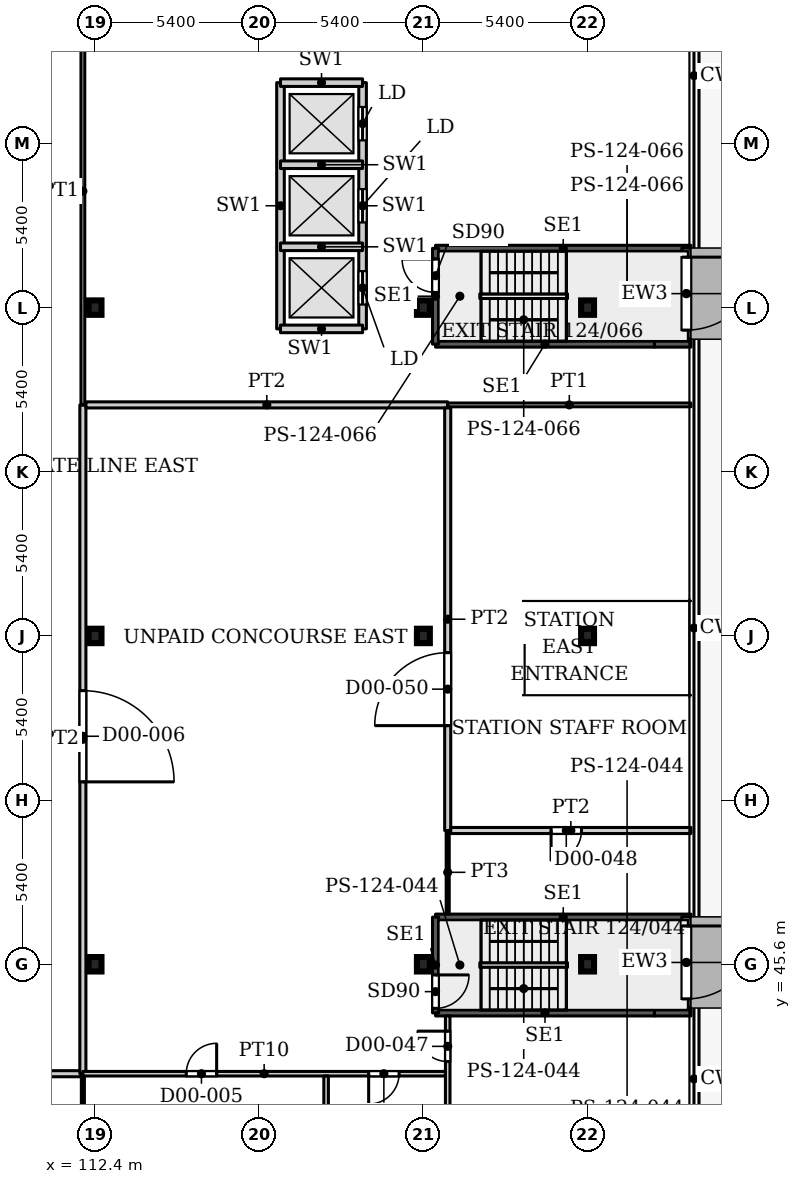
"""IFC4 building model, lengths in metres.
Left out: names, types, materials, properties, quantities, classifications, styles, units other than length and angle.
Written with IfcOpenShell. Run it as: python <this file> out.ifc"""

import sys

from ifc_helpers import new_model, si_unit, direction, frame, frame_2d, origin, origin_2d, place, context, subcontext, project, spatial, rectangle, i_section, extrude, source, transform, mapped, element, fill, save


model = new_model("IFC4")
c1 = context("Model", 3, precision=1e-05, world=origin(), true_north=direction((0.0, 1.0)))
c2 = subcontext(c1, "Body", "Model", "MODEL_VIEW")
j1 = project(units=[si_unit("LENGTHUNIT", "METRE"), si_unit("PLANEANGLEUNIT", "RADIAN")], contexts=[c1])
p1 = place(None, origin())
s1 = spatial("IfcSite", under=j1, at=p1, CompositionType="ELEMENT")
p2 = place(p1, origin())
s2 = spatial("IfcBuilding", under=s1, at=p2, CompositionType="ELEMENT")
p3 = place(p2, origin())
s3 = spatial("IfcBuildingStorey", under=s2, at=p3, CompositionType="ELEMENT", Elevation=0.0)
for number, where, z_axis, x_axis in (
    (1, (112.4, 45.6, 0.0), (0.0, 0.0, 1.0), (1.0, 0.0, 0.0)),
    (2, (123.2, 45.6, 0.0), (0.0, 0.0, 1.0), (1.0, 0.0, 0.0)),
    (3, (128.6, 45.6, 0.0), (0.0, 0.0, 1.0), (1.0, 0.0, 0.0)),
    (4, (112.4, 56.4, 0.0), (0.0, 0.0, 1.0), (1.0, 0.0, 0.0)),
    (5, (123.2, 56.4, 0.0), (0.0, 0.0, 1.0), (1.0, 0.0, 0.0)),
    (6, (128.6, 56.4, 0.0), (0.0, 0.0, 1.0), (1.0, 0.0, 0.0)),
    (7, (112.4, 67.2, 0.0), (0.0, 0.0, 1.0), (1.0, 0.0, 0.0)),
    (8, (123.2, 67.2, 0.0), (0.0, 0.0, 1.0), (1.0, 0.0, 0.0)),
    (9, (128.6, 67.2, 0.0), (0.0, 0.0, 1.0), (1.0, 0.0, 0.0)),
):
    element("IfcColumn", number, at=place(p3, frame(where, z_axis=z_axis, x_axis=x_axis)), inside=s3, PredefinedType="COLUMN", context=c2, shape_type="SweptSolid", body=[
        extrude(i_section(OverallWidth=0.424, OverallDepth=0.474, WebThickness=0.048, FlangeThickness=0.077, FilletRadius=0.014, at=origin_2d()), origin(), (0.0, 0.0, 1.0), 7.5),
    ])
p4 = place(p3, frame((131.85, 69.16, 0.0), z_axis=(0.0, 0.0, 1.0), x_axis=(0.0, -1.0, 0.0)))
e10 = element("IfcWall", 10, at=p4, inside=s3, PredefinedType="SOLIDWALL", context=c2, shape_type="SweptSolid", body=[
    extrude(rectangle(XDim=3.0, YDim=0.3, at=frame_2d((1.5, 0.0))), origin(), (0.0, 0.0, 1.0), 7.25),
])
p5 = place(p4, frame((0.3, 0.0, 0.0)))
e11 = element("IfcOpeningElement", 11, at=p5, cuts=e10, PredefinedType="OPENING", context=c2, shape_type="SweptSolid", body=[
    extrude(rectangle(XDim=2.4, YDim=2.7, at=frame_2d((1.2, 1.35))), frame((0.0, 0.16, 0.0), z_axis=(0.0, -1.0, 0.0), x_axis=(1.0, 0.0, 0.0)), (0.0, 0.0, 1.0), 0.32),
])
p6 = place(p3, frame((131.85, 47.16, 0.0), z_axis=(0.0, 0.0, 1.0), x_axis=(0.0, -1.0, 0.0)))
e12 = element("IfcWall", 12, at=p6, inside=s3, PredefinedType="SOLIDWALL", context=c2, shape_type="SweptSolid", body=[
    extrude(rectangle(XDim=3.0, YDim=0.3, at=frame_2d((1.5, 0.0))), origin(), (0.0, 0.0, 1.0), 7.25),
])
p7 = place(p6, frame((0.3, 0.0, 0.0)))
e13 = element("IfcOpeningElement", 13, at=p7, cuts=e12, PredefinedType="OPENING", context=c2, shape_type="SweptSolid", body=[
    extrude(rectangle(XDim=2.4, YDim=2.7, at=frame_2d((1.2, 1.35))), frame((0.0, 0.16, 0.0), z_axis=(0.0, -1.0, 0.0), x_axis=(1.0, 0.0, 0.0)), (0.0, 0.0, 1.0), 0.32),
])
p8 = place(p3, frame((118.5, 66.5, 0.0), z_axis=(0.0, 0.0, 1.0), x_axis=(0.0, 1.0, 0.0)))
e14 = element("IfcWall", 14, at=p8, inside=s3, PredefinedType="PARTITIONING", context=c2, shape_type="SweptSolid", body=[
    extrude(rectangle(XDim=8.1, YDim=0.25, at=frame_2d((4.05, 0.0))), origin(), (0.0, 0.0, 1.0), 7.5),
])
p9 = place(p3, frame((121.2, 66.5, 0.0), z_axis=(0.0, 0.0, 1.0), x_axis=(0.0, 1.0, 0.0)))
e15 = element("IfcWall", 15, at=p9, inside=s3, PredefinedType="PARTITIONING", context=c2, shape_type="SweptSolid", body=[
    extrude(rectangle(XDim=8.1, YDim=0.25, at=frame_2d((4.05, 0.0))), origin(), (0.0, 0.0, 1.0), 7.5),
])
p10 = place(p9, frame((0.8, 0.0, 0.0)))
e16 = element("IfcOpeningElement", 16, at=p10, cuts=e15, PredefinedType="OPENING", context=c2, shape_type="SweptSolid", body=[
    extrude(rectangle(XDim=1.1, YDim=2.2, at=frame_2d((0.55, 1.1))), frame((0.0, 0.135, 0.0), z_axis=(0.0, -1.0, 0.0), x_axis=(1.0, 0.0, 0.0)), (0.0, 0.0, 1.0), 0.27),
])
p11 = place(p9, frame((3.5, 0.0, 0.0)))
e17 = element("IfcOpeningElement", 17, at=p11, cuts=e15, PredefinedType="OPENING", context=c2, shape_type="SweptSolid", body=[
    extrude(rectangle(XDim=1.1, YDim=2.2, at=frame_2d((0.55, 1.1))), frame((0.0, 0.135, 0.0), z_axis=(0.0, -1.0, 0.0), x_axis=(1.0, 0.0, 0.0)), (0.0, 0.0, 1.0), 0.27),
])
p12 = place(p9, frame((6.2, 0.0, 0.0)))
e18 = element("IfcOpeningElement", 18, at=p12, cuts=e15, PredefinedType="OPENING", context=c2, shape_type="SweptSolid", body=[
    extrude(rectangle(XDim=1.1, YDim=2.2, at=frame_2d((0.55, 1.1))), frame((0.0, 0.135, 0.0), z_axis=(0.0, -1.0, 0.0), x_axis=(1.0, 0.0, 0.0)), (0.0, 0.0, 1.0), 0.27),
])
for number, where, z_axis, x_axis in (
    (19, (118.5, 66.5, 0.0), (0.0, 0.0, 1.0), (1.0, 0.0, 0.0)),
    (20, (118.5, 69.2, 0.0), (0.0, 0.0, 1.0), (1.0, 0.0, 0.0)),
    (21, (118.5, 71.9, 0.0), (0.0, 0.0, 1.0), (1.0, 0.0, 0.0)),
    (22, (118.5, 74.6, 0.0), (0.0, 0.0, 1.0), (1.0, 0.0, 0.0)),
):
    element("IfcWall", number, at=place(p3, frame(where, z_axis=z_axis, x_axis=x_axis)), inside=s3, PredefinedType="PARTITIONING", context=c2, shape_type="SweptSolid", body=[
        extrude(rectangle(XDim=2.7, YDim=0.25, at=frame_2d((1.35, 0.0))), origin(), (0.0, 0.0, 1.0), 7.5),
    ])
p13 = place(p3, frame((123.6, 44.0, 0.0), z_axis=(0.0, 0.0, 1.0), x_axis=(1.0, 0.0, 0.0)))
e23 = element("IfcWall", 23, at=p13, inside=s3, PredefinedType="SHEAR", context=c2, shape_type="SweptSolid", body=[
    extrude(rectangle(XDim=7.2, YDim=0.2, at=frame_2d((3.6, 0.0))), origin(), (0.0, 0.0, 1.0), 7.5),
])
p14 = place(p3, frame((130.8, 44.0, 0.0), z_axis=(0.0, 0.0, 1.0), x_axis=(1.0, 0.0, 0.0)))
e24 = element("IfcWall", 24, at=p14, inside=s3, PredefinedType="SHEAR", context=c2, shape_type="SweptSolid", body=[
    extrude(rectangle(XDim=1.2, YDim=0.2, at=frame_2d((0.6, 0.0))), origin(), (0.0, 0.0, 1.0), 7.5),
])
p15 = place(p3, frame((123.6, 47.15, 0.0), z_axis=(0.0, 0.0, 1.0), x_axis=(1.0, 0.0, 0.0)))
e25 = element("IfcWall", 25, at=p15, inside=s3, PredefinedType="SHEAR", context=c2, shape_type="SweptSolid", body=[
    extrude(rectangle(XDim=8.4, YDim=0.2, at=frame_2d((4.2, 0.0))), origin(), (0.0, 0.0, 1.0), 7.5),
])
p16 = place(p3, frame((123.6, 44.0, 0.0), z_axis=(0.0, 0.0, 1.0), x_axis=(0.0, 1.0, 0.0)))
e26 = element("IfcWall", 26, at=p16, inside=s3, PredefinedType="SHEAR", context=c2, shape_type="SweptSolid", body=[
    extrude(rectangle(XDim=3.15, YDim=0.2, at=frame_2d((1.575, 0.0))), origin(), (0.0, 0.0, 1.0), 7.5),
])
p17 = place(p16, frame((0.15, 0.0, 0.0)))
e27 = element("IfcOpeningElement", 27, at=p17, cuts=e26, PredefinedType="OPENING", context=c2, shape_type="SweptSolid", body=[
    extrude(rectangle(XDim=1.1, YDim=2.2, at=frame_2d((0.55, 1.1))), frame((0.0, 0.11, 0.0), z_axis=(0.0, -1.0, 0.0), x_axis=(1.0, 0.0, 0.0)), (0.0, 0.0, 1.0), 0.22),
])
p18 = place(p3, frame((123.6, 66.0, 0.0), z_axis=(0.0, 0.0, 1.0), x_axis=(1.0, 0.0, 0.0)))
e28 = element("IfcWall", 28, at=p18, inside=s3, PredefinedType="SHEAR", context=c2, shape_type="SweptSolid", body=[
    extrude(rectangle(XDim=7.2, YDim=0.2, at=frame_2d((3.6, 0.0))), origin(), (0.0, 0.0, 1.0), 7.5),
])
p19 = place(p3, frame((130.8, 66.0, 0.0), z_axis=(0.0, 0.0, 1.0), x_axis=(1.0, 0.0, 0.0)))
e29 = element("IfcWall", 29, at=p19, inside=s3, PredefinedType="SHEAR", context=c2, shape_type="SweptSolid", body=[
    extrude(rectangle(XDim=1.2, YDim=0.2, at=frame_2d((0.6, 0.0))), origin(), (0.0, 0.0, 1.0), 7.5),
])
p20 = place(p3, frame((123.6, 69.15, 0.0), z_axis=(0.0, 0.0, 1.0), x_axis=(1.0, 0.0, 0.0)))
e30 = element("IfcWall", 30, at=p20, inside=s3, PredefinedType="SHEAR", context=c2, shape_type="SweptSolid", body=[
    extrude(rectangle(XDim=8.4, YDim=0.2, at=frame_2d((4.2, 0.0))), origin(), (0.0, 0.0, 1.0), 7.5),
])
p21 = place(p3, frame((123.6, 66.0, 0.0), z_axis=(0.0, 0.0, 1.0), x_axis=(0.0, 1.0, 0.0)))
e31 = element("IfcWall", 31, at=p21, inside=s3, PredefinedType="SHEAR", context=c2, shape_type="SweptSolid", body=[
    extrude(rectangle(XDim=3.15, YDim=0.2, at=frame_2d((1.575, 0.0))), origin(), (0.0, 0.0, 1.0), 7.5),
])
p22 = place(p21, frame((1.7, 0.0, 0.0)))
e32 = element("IfcOpeningElement", 32, at=p22, cuts=e31, PredefinedType="OPENING", context=c2, shape_type="SweptSolid", body=[
    extrude(rectangle(XDim=1.1, YDim=2.2, at=frame_2d((0.55, 1.1))), frame((0.0, 0.11, 0.0), z_axis=(0.0, -1.0, 0.0), x_axis=(1.0, 0.0, 0.0)), (0.0, 0.0, 1.0), 0.22),
])
p23 = place(p3, frame((47.9, 42.0, 0.0), z_axis=(0.0, 0.0, 1.0), x_axis=(1.0, 0.0, 0.0)))
e33 = element("IfcWall", 33, at=p23, inside=s3, PredefinedType="PARTITIONING", context=c2, shape_type="SweptSolid", body=[
    extrude(rectangle(XDim=64.1, YDim=0.2, at=frame_2d((32.05, 0.0))), origin(), (0.0, 0.0, 1.0), 7.08),
])
p24 = place(p23, frame((47.5, 0.0, 0.0)))
e34 = element("IfcOpeningElement", 34, at=p24, cuts=e33, PredefinedType="OPENING", context=c2, shape_type="SweptSolid", body=[
    extrude(rectangle(XDim=1.0, YDim=2.1, at=frame_2d((0.5, 1.05))), frame((0.0, 0.11, 0.0), z_axis=(0.0, -1.0, 0.0), x_axis=(1.0, 0.0, 0.0)), (0.0, 0.0, 1.0), 0.22),
])
p25 = place(p23, frame((55.5, 0.0, 0.0)))
e35 = element("IfcOpeningElement", 35, at=p25, cuts=e33, PredefinedType="OPENING", context=c2, shape_type="SweptSolid", body=[
    extrude(rectangle(XDim=1.0, YDim=2.1, at=frame_2d((0.5, 1.05))), frame((0.0, 0.11, 0.0), z_axis=(0.0, -1.0, 0.0), x_axis=(1.0, 0.0, 0.0)), (0.0, 0.0, 1.0), 0.22),
])
p26 = place(p3, frame((112.0, 30.125, 0.0), z_axis=(0.0, 0.0, 1.0), x_axis=(0.0, 1.0, 0.0)))
e36 = element("IfcWall", 36, at=p26, inside=s3, PredefinedType="PARTITIONING", context=c2, shape_type="SweptSolid", body=[
    extrude(rectangle(XDim=11.875, YDim=0.1, at=frame_2d((5.938, 0.0))), origin(), (0.0, 0.0, 1.0), 7.08),
])
p27 = place(p3, frame((112.0, 42.0, 0.0), z_axis=(0.0, 0.0, 1.0), x_axis=(0.0, 1.0, 0.0)))
e37 = element("IfcWall", 37, at=p27, inside=s3, PredefinedType="PARTITIONING", context=c2, shape_type="SweptSolid", body=[
    extrude(rectangle(XDim=22.0, YDim=0.2, at=frame_2d((11.0, 0.0))), origin(), (0.0, 0.0, 1.0), 7.08),
])
p28 = place(p27, frame((9.6, 0.0, 0.0)))
e38 = element("IfcOpeningElement", 38, at=p28, cuts=e37, PredefinedType="OPENING", context=c2, shape_type="SweptSolid", body=[
    extrude(rectangle(XDim=3.0, YDim=2.1, at=frame_2d((1.5, 1.05))), frame((0.0, 0.11, 0.0), z_axis=(0.0, -1.0, 0.0), x_axis=(1.0, 0.0, 0.0)), (0.0, 0.0, 1.0), 0.22),
])
p29 = place(p3, frame((112.0, 42.0, 0.0), z_axis=(0.0, 0.0, 1.0), x_axis=(1.0, 0.0, 0.0)))
e39 = element("IfcWall", 39, at=p29, inside=s3, PredefinedType="PARTITIONING", context=c2, shape_type="SweptSolid", body=[
    extrude(rectangle(XDim=11.925, YDim=0.15, at=frame_2d((5.962, 0.0))), origin(), (0.0, 0.0, 1.0), 7.08),
])
p30 = place(p29, frame((3.4, 0.0, 0.0)))
e40 = element("IfcOpeningElement", 40, at=p30, cuts=e39, PredefinedType="OPENING", context=c2, shape_type="SweptSolid", body=[
    extrude(rectangle(XDim=1.0, YDim=2.1, at=frame_2d((0.5, 1.05))), frame((0.0, 0.085, 0.0), z_axis=(0.0, -1.0, 0.0), x_axis=(1.0, 0.0, 0.0)), (0.0, 0.0, 1.0), 0.17),
])
p31 = place(p29, frame((9.4, 0.0, 0.0)))
e41 = element("IfcOpeningElement", 41, at=p31, cuts=e39, PredefinedType="OPENING", context=c2, shape_type="SweptSolid", body=[
    extrude(rectangle(XDim=1.0, YDim=2.1, at=frame_2d((0.5, 1.05))), frame((0.0, 0.085, 0.0), z_axis=(0.0, -1.0, 0.0), x_axis=(1.0, 0.0, 0.0)), (0.0, 0.0, 1.0), 0.17),
])
p32 = place(p3, frame((112.0, 64.0, 0.0), z_axis=(0.0, 0.0, 1.0), x_axis=(0.0, 1.0, 0.0)))
e42 = element("IfcWall", 42, at=p32, inside=s3, PredefinedType="PARTITIONING", context=c2, shape_type="SweptSolid", body=[
    extrude(rectangle(XDim=14.062, YDim=0.125, at=frame_2d((7.031, 0.0))), origin(), (0.0, 0.0, 1.0), 7.08),
])
p33 = place(p3, frame((112.1, 64.0, 0.0), z_axis=(0.0, 0.0, 1.0), x_axis=(1.0, 0.0, 0.0)))
e43 = element("IfcWall", 43, at=p33, inside=s3, PredefinedType="PARTITIONING", context=c2, shape_type="SweptSolid", body=[
    extrude(rectangle(XDim=11.9, YDim=0.2, at=frame_2d((5.95, 0.0))), origin(), (0.0, 0.0, 1.0), 7.08),
])
p34 = place(p3, frame((120.0, 30.125, 0.0), z_axis=(0.0, 0.0, 1.0), x_axis=(0.0, 1.0, 0.0)))
e44 = element("IfcWall", 44, at=p34, inside=s3, PredefinedType="PARTITIONING", context=c2, shape_type="SweptSolid", body=[
    extrude(rectangle(XDim=11.8, YDim=0.15, at=frame_2d((5.9, 0.0))), origin(), (0.0, 0.0, 1.0), 7.08),
])
p35 = place(p3, frame((124.0, 30.125, 0.0), z_axis=(0.0, 0.0, 1.0), x_axis=(0.0, 1.0, 0.0)))
e45 = element("IfcWall", 45, at=p35, inside=s3, PredefinedType="PARTITIONING", context=c2, shape_type="SweptSolid", body=[
    extrude(rectangle(XDim=13.776, YDim=0.15, at=frame_2d((6.888, 0.0))), origin(), (0.0, 0.0, 1.0), 7.08),
])
p36 = place(p35, frame((12.275, 0.0, 0.0)))
e46 = element("IfcOpeningElement", 46, at=p36, cuts=e45, PredefinedType="OPENING", context=c2, shape_type="SweptSolid", body=[
    extrude(rectangle(XDim=1.0, YDim=2.1, at=frame_2d((0.5, 1.05))), frame((0.0, 0.085, 0.0), z_axis=(0.0, -1.0, 0.0), x_axis=(1.0, 0.0, 0.0)), (0.0, 0.0, 1.0), 0.17),
])
p37 = place(p3, frame((124.0, 47.249, 0.0), z_axis=(0.0, 0.0, 1.0), x_axis=(0.0, 1.0, 0.0)))
e47 = element("IfcWall", 47, at=p37, inside=s3, PredefinedType="PARTITIONING", context=c2, shape_type="SweptSolid", body=[
    extrude(rectangle(XDim=2.751, YDim=0.1, at=frame_2d((1.375, 0.0))), origin(), (0.0, 0.0, 1.0), 7.08),
])
p38 = place(p3, frame((124.0, 50.0, 0.0), z_axis=(0.0, 0.0, 1.0), x_axis=(0.0, 1.0, 0.0)))
e48 = element("IfcWall", 48, at=p38, inside=s3, PredefinedType="PARTITIONING", context=c2, shape_type="SweptSolid", body=[
    extrude(rectangle(XDim=13.9, YDim=0.2, at=frame_2d((6.95, 0.0))), origin(), (0.0, 0.0, 1.0), 7.08),
])
p39 = place(p38, frame((3.45, 0.0, 0.0)))
e49 = element("IfcOpeningElement", 49, at=p39, cuts=e48, PredefinedType="OPENING", context=c2, shape_type="SweptSolid", body=[
    extrude(rectangle(XDim=2.4, YDim=2.1, at=frame_2d((1.2, 1.05))), frame((0.0, 0.11, 0.0), z_axis=(0.0, -1.0, 0.0), x_axis=(1.0, 0.0, 0.0)), (0.0, 0.0, 1.0), 0.22),
])
p40 = place(p3, frame((124.0, 64.0, 0.0), z_axis=(0.0, 0.0, 1.0), x_axis=(1.0, 0.0, 0.0)))
e50 = element("IfcWall", 50, at=p40, inside=s3, PredefinedType="PARTITIONING", context=c2, shape_type="SweptSolid", body=[
    extrude(rectangle(XDim=8.0, YDim=0.125, at=frame_2d((4.0, 0.0))), origin(), (0.0, 0.0, 1.0), 7.08),
])
p41 = place(p3, frame((124.1, 50.0, 0.0), z_axis=(0.0, 0.0, 1.0), x_axis=(1.0, 0.0, 0.0)))
e51 = element("IfcWall", 51, at=p41, inside=s3, PredefinedType="PARTITIONING", context=c2, shape_type="SweptSolid", body=[
    extrude(rectangle(XDim=7.9, YDim=0.2, at=frame_2d((3.95, 0.0))), origin(), (0.0, 0.0, 1.0), 7.08),
])
p42 = place(p41, frame((3.3, 0.0, 0.0)))
e52 = element("IfcOpeningElement", 52, at=p42, cuts=e51, PredefinedType="OPENING", context=c2, shape_type="SweptSolid", body=[
    extrude(rectangle(XDim=1.0, YDim=2.1, at=frame_2d((0.5, 1.05))), frame((0.0, 0.11, 0.0), z_axis=(0.0, -1.0, 0.0), x_axis=(1.0, 0.0, 0.0)), (0.0, 0.0, 1.0), 0.22),
])
m1 = source(origin(), c2, "Body", "SweptSolid", [
    extrude(rectangle(XDim=2.4, YDim=2.7, at=frame_2d((1.2, 1.35))), frame((0.0, 0.025, 0.0), z_axis=(0.0, -1.0, 0.0), x_axis=(1.0, 0.0, 0.0)), (0.0, 0.0, 1.0), 0.05),
])
p43 = place(p5, origin())
e53 = element("IfcDoor", 53, at=p43, inside=s3, OperationType="DOUBLE_DOOR_SINGLE_SWING", PredefinedType="DOOR", context=c2, shape_type="MappedRepresentation", body=[
    mapped(m1, transform((0.0, 0.0, 0.0), x_axis=(1.0, 0.0, 0.0), y_axis=(0.0, 1.0, 0.0), z_axis=(0.0, 0.0, 1.0), scale=1.0)),
])
fill(e11, e53)
p44 = place(p7, origin())
e54 = element("IfcDoor", 54, at=p44, inside=s3, OperationType="DOUBLE_DOOR_SINGLE_SWING", PredefinedType="DOOR", context=c2, shape_type="MappedRepresentation", body=[
    mapped(m1, transform((0.0, 0.0, 0.0), x_axis=(1.0, 0.0, 0.0), y_axis=(0.0, 1.0, 0.0), z_axis=(0.0, 0.0, 1.0), scale=1.0)),
])
fill(e13, e54)
m2 = source(origin(), c2, "Body", "SweptSolid", [
    extrude(rectangle(XDim=1.1, YDim=2.2, at=frame_2d((0.55, 1.1))), frame((0.0, 0.025, 0.0), z_axis=(0.0, -1.0, 0.0), x_axis=(1.0, 0.0, 0.0)), (0.0, 0.0, 1.0), 0.05),
])
p45 = place(p10, origin())
e55 = element("IfcDoor", 55, at=p45, inside=s3, OperationType="SLIDING_TO_LEFT", PredefinedType="DOOR", context=c2, shape_type="MappedRepresentation", body=[
    mapped(m2, transform((0.0, 0.0, 0.0), x_axis=(1.0, 0.0, 0.0), y_axis=(0.0, 1.0, 0.0), z_axis=(0.0, 0.0, 1.0), scale=1.0)),
])
fill(e16, e55)
p46 = place(p11, origin())
e56 = element("IfcDoor", 56, at=p46, inside=s3, OperationType="SLIDING_TO_LEFT", PredefinedType="DOOR", context=c2, shape_type="MappedRepresentation", body=[
    mapped(m2, transform((0.0, 0.0, 0.0), x_axis=(1.0, 0.0, 0.0), y_axis=(0.0, 1.0, 0.0), z_axis=(0.0, 0.0, 1.0), scale=1.0)),
])
fill(e17, e56)
p47 = place(p12, origin())
e57 = element("IfcDoor", 57, at=p47, inside=s3, OperationType="SLIDING_TO_LEFT", PredefinedType="DOOR", context=c2, shape_type="MappedRepresentation", body=[
    mapped(m2, transform((0.0, 0.0, 0.0), x_axis=(1.0, 0.0, 0.0), y_axis=(0.0, 1.0, 0.0), z_axis=(0.0, 0.0, 1.0), scale=1.0)),
])
fill(e18, e57)
m3 = source(origin(), c2, "Body", "SweptSolid", [
    extrude(rectangle(XDim=1.1, YDim=2.2, at=frame_2d((0.55, 1.1))), frame((0.0, 0.025, 0.0), z_axis=(0.0, -1.0, 0.0), x_axis=(1.0, 0.0, 0.0)), (0.0, 0.0, 1.0), 0.05),
])
p48 = place(p17, origin())
e58 = element("IfcDoor", 58, at=p48, inside=s3, OperationType="SINGLE_SWING_RIGHT", PredefinedType="DOOR", context=c2, shape_type="MappedRepresentation", body=[
    mapped(m3, transform((0.0, 0.0, 0.0), x_axis=(1.0, 0.0, 0.0), y_axis=(0.0, 1.0, 0.0), z_axis=(0.0, 0.0, 1.0), scale=1.0)),
])
fill(e27, e58)
p49 = place(p22, origin())
e59 = element("IfcDoor", 59, at=p49, inside=s3, OperationType="SINGLE_SWING_LEFT", PredefinedType="DOOR", context=c2, shape_type="MappedRepresentation", body=[
    mapped(m3, transform((0.0, 0.0, 0.0), x_axis=(1.0, 0.0, 0.0), y_axis=(0.0, 1.0, 0.0), z_axis=(0.0, 0.0, 1.0), scale=1.0)),
])
fill(e32, e59)
m4 = source(origin(), c2, "Body", "SweptSolid", [
    extrude(rectangle(XDim=1.0, YDim=2.1, at=frame_2d((0.5, 1.05))), frame((0.0, 0.025, 0.0), z_axis=(0.0, -1.0, 0.0), x_axis=(1.0, 0.0, 0.0)), (0.0, 0.0, 1.0), 0.05),
])
p50 = place(p30, origin())
e60 = element("IfcDoor", 60, at=p50, inside=s3, OperationType="SINGLE_SWING_LEFT", PredefinedType="DOOR", context=c2, shape_type="MappedRepresentation", body=[
    mapped(m4, transform((0.0, 0.0, 0.0), x_axis=(1.0, 0.0, 0.0), y_axis=(0.0, 1.0, 0.0), z_axis=(0.0, 0.0, 1.0), scale=1.0)),
])
fill(e40, e60)
m5 = source(origin(), c2, "Body", "SweptSolid", [
    extrude(rectangle(XDim=3.0, YDim=2.1, at=frame_2d((1.5, 1.05))), frame((0.0, 0.025, 0.0), z_axis=(0.0, -1.0, 0.0), x_axis=(1.0, 0.0, 0.0)), (0.0, 0.0, 1.0), 0.05),
])
p51 = place(p28, origin())
e61 = element("IfcDoor", 61, at=p51, inside=s3, OperationType="DOUBLE_DOOR_SINGLE_SWING", PredefinedType="DOOR", context=c2, shape_type="MappedRepresentation", body=[
    mapped(m5, transform((0.0, 0.0, 0.0), x_axis=(1.0, 0.0, 0.0), y_axis=(0.0, 1.0, 0.0), z_axis=(0.0, 0.0, 1.0), scale=1.0)),
])
fill(e38, e61)
p52 = place(p36, origin())
e62 = element("IfcDoor", 62, at=p52, inside=s3, OperationType="SINGLE_SWING_LEFT", PredefinedType="DOOR", context=c2, shape_type="MappedRepresentation", body=[
    mapped(m4, transform((0.0, 0.0, 0.0), x_axis=(1.0, 0.0, 0.0), y_axis=(0.0, 1.0, 0.0), z_axis=(0.0, 0.0, 1.0), scale=1.0)),
])
fill(e46, e62)
m6 = source(origin(), c2, "Body", "SweptSolid", [
    extrude(rectangle(XDim=1.0, YDim=2.1, at=frame_2d((0.5, 1.05))), frame((0.0, 0.025, 0.0), z_axis=(0.0, -1.0, 0.0), x_axis=(1.0, 0.0, 0.0)), (0.0, 0.0, 1.0), 0.05),
])
p53 = place(p42, origin())
e63 = element("IfcDoor", 63, at=p53, inside=s3, OperationType="SINGLE_SWING_RIGHT", PredefinedType="DOOR", context=c2, shape_type="MappedRepresentation", body=[
    mapped(m6, transform((0.0, 0.0, 0.0), x_axis=(1.0, 0.0, 0.0), y_axis=(0.0, 1.0, 0.0), z_axis=(0.0, 0.0, 1.0), scale=1.0)),
])
fill(e52, e63)
p54 = place(p31, origin())
e64 = element("IfcDoor", 64, at=p54, inside=s3, OperationType="SINGLE_SWING_RIGHT", PredefinedType="DOOR", context=c2, shape_type="MappedRepresentation", body=[
    mapped(m4, transform((0.0, 0.0, 0.0), x_axis=(1.0, 0.0, 0.0), y_axis=(0.0, 1.0, 0.0), z_axis=(0.0, 0.0, 1.0), scale=1.0)),
])
fill(e41, e64)
m7 = source(origin(), c2, "Body", "SweptSolid", [
    extrude(rectangle(XDim=2.4, YDim=2.1, at=frame_2d((1.2, 1.05))), frame((0.0, 0.025, 0.0), z_axis=(0.0, -1.0, 0.0), x_axis=(1.0, 0.0, 0.0)), (0.0, 0.0, 1.0), 0.05),
])
p55 = place(p39, origin())
e65 = element("IfcDoor", 65, at=p55, inside=s3, OperationType="DOUBLE_DOOR_SINGLE_SWING", PredefinedType="DOOR", context=c2, shape_type="MappedRepresentation", body=[
    mapped(m7, transform((0.0, 0.0, 0.0), x_axis=(1.0, 0.0, 0.0), y_axis=(0.0, 1.0, 0.0), z_axis=(0.0, 0.0, 1.0), scale=1.0)),
])
fill(e49, e65)
save(model, sys.argv[1])
